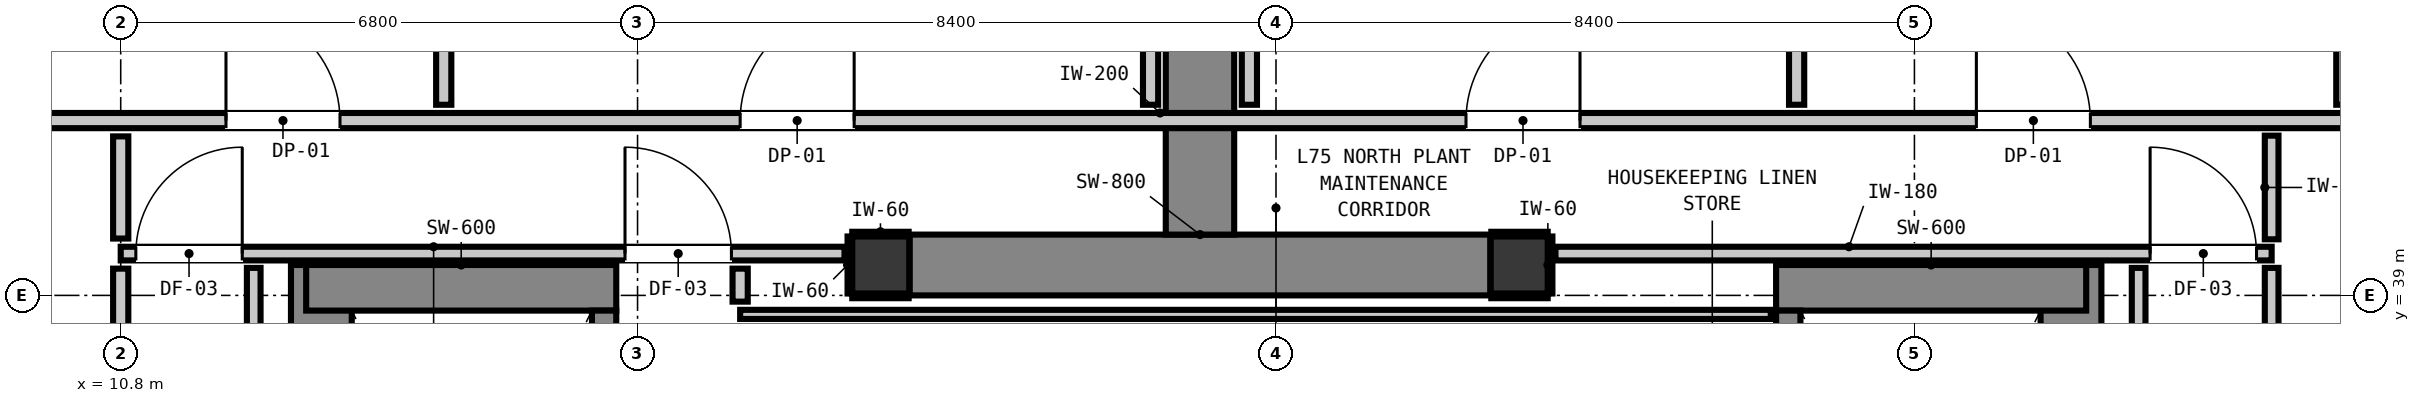
"""IFC4 building model, lengths in metres.
Left out: names, types, materials, properties, quantities, classifications, styles, units other than length and angle.
Written with IfcOpenShell. Run it as: python <this file> out.ifc"""

import sys

from ifc_helpers import new_model, si_unit, direction, frame, frame_2d, origin, origin_2d, place, context, subcontext, project, spatial, rectangle, extrude, element, fill, save


model = new_model("IFC4")
c1 = context("Model", 3, precision=1e-05, world=origin(), true_north=direction((0.0, 1.0)))
c2 = subcontext(c1, "Body", "Model", "MODEL_VIEW")
j1 = project(units=[si_unit("LENGTHUNIT", "METRE"), si_unit("PLANEANGLEUNIT", "RADIAN")], contexts=[c1])
p1 = place(None, origin())
s1 = spatial("IfcSite", under=j1, at=p1, CompositionType="ELEMENT")
p2 = place(p1, origin())
s2 = spatial("IfcBuilding", under=s1, at=p2, CompositionType="ELEMENT")
p3 = place(p2, frame((0.0, 0.0, 257.84)))
s3 = spatial("IfcBuildingStorey", under=s2, at=p3, CompositionType="ELEMENT", Elevation=257.84)
for number, where, z_axis, x_axis in (
    (1, (20.8, 39.4, 0.0), (0.0, 0.0, 1.0), (1.0, 0.0, 0.0)),
    (2, (29.2, 39.4, 0.0), (0.0, 0.0, 1.0), (1.0, 0.0, 0.0)),
):
    element("IfcColumn", number, at=place(p3, frame(where, z_axis=z_axis, x_axis=x_axis)), inside=s3, PredefinedType="COLUMN", context=c2, shape_type="SweptSolid", body=[
        extrude(rectangle(XDim=0.75, YDim=0.75, at=origin_2d()), origin(), (0.0, 0.0, 1.0), 4.4),
    ])
p4 = place(p3, frame((13.44, 31.08, 0.0), z_axis=(0.0, 0.0, 1.0), x_axis=(0.0, 1.0, 0.0)))
e3 = element("IfcWall", 3, at=p4, inside=s3, PredefinedType="SHEAR", context=c2, shape_type="SweptSolid", body=[
    extrude(rectangle(XDim=8.32, YDim=0.8, at=frame_2d((4.16, 0.0))), origin(), (0.0, 0.0, 1.0), 4.4),
])
p5 = place(p3, frame((13.24, 39.1, 0.0), z_axis=(0.0, 0.0, 1.0), x_axis=(1.0, 0.0, 0.0)))
e4 = element("IfcWall", 4, at=p5, inside=s3, PredefinedType="SHEAR", context=c2, shape_type="SweptSolid", body=[
    extrude(rectangle(XDim=4.08, YDim=0.6, at=frame_2d((2.04, 0.0))), origin(), (0.0, 0.0, 1.0), 4.4),
])
p6 = place(p3, frame((36.46, 31.08, 0.0), z_axis=(0.0, 0.0, 1.0), x_axis=(0.0, 1.0, 0.0)))
e5 = element("IfcWall", 5, at=p6, inside=s3, PredefinedType="SHEAR", context=c2, shape_type="SweptSolid", body=[
    extrude(rectangle(XDim=8.32, YDim=0.8, at=frame_2d((4.16, 0.0))), origin(), (0.0, 0.0, 1.0), 4.4),
])
p7 = place(p3, frame((32.58, 39.1, 0.0), z_axis=(0.0, 0.0, 1.0), x_axis=(1.0, 0.0, 0.0)))
e6 = element("IfcWall", 6, at=p7, inside=s3, PredefinedType="SHEAR", context=c2, shape_type="SweptSolid", body=[
    extrude(rectangle(XDim=4.08, YDim=0.6, at=frame_2d((2.04, 0.0))), origin(), (0.0, 0.0, 1.0), 4.4),
])
p8 = place(p3, frame((21.18, 39.4, 0.0), z_axis=(0.0, 0.0, 1.0), x_axis=(1.0, 0.0, 0.0)))
e7 = element("IfcWall", 7, at=p8, inside=s3, PredefinedType="SHEAR", context=c2, shape_type="SweptSolid", body=[
    extrude(rectangle(XDim=7.64, YDim=0.8, at=frame_2d((3.82, 0.0))), origin(), (0.0, 0.0, 1.0), 4.4),
])
p9 = place(p3, frame((17.16, 31.0, 0.0), z_axis=(0.0, 0.0, 1.0), x_axis=(0.0, 1.0, 0.0)))
e8 = element("IfcWall", 8, at=p9, inside=s3, PredefinedType="SHEAR", context=c2, shape_type="SweptSolid", body=[
    extrude(rectangle(XDim=7.8, YDim=0.32, at=frame_2d((3.9, 0.0))), origin(), (0.0, 0.0, 1.0), 4.4),
])
p10 = place(p9, frame((0.19, 0.0, 0.0)))
e9 = element("IfcOpeningElement", 9, at=p10, cuts=e8, PredefinedType="OPENING", context=c2, shape_type="SweptSolid", body=[
    extrude(rectangle(XDim=1.1, YDim=2.15, at=frame_2d((0.55, 1.075))), frame((0.0, 0.17, 0.0), z_axis=(0.0, -1.0, 0.0), x_axis=(1.0, 0.0, 0.0)), (0.0, 0.0, 1.0), 0.34),
])
p11 = place(p3, frame((32.74, 31.0, 0.0), z_axis=(0.0, 0.0, 1.0), x_axis=(0.0, 1.0, 0.0)))
e10 = element("IfcWall", 10, at=p11, inside=s3, PredefinedType="SHEAR", context=c2, shape_type="SweptSolid", body=[
    extrude(rectangle(XDim=7.8, YDim=0.32, at=frame_2d((3.9, 0.0))), origin(), (0.0, 0.0, 1.0), 4.4),
])
p12 = place(p11, frame((0.19, 0.0, 0.0)))
e11 = element("IfcOpeningElement", 11, at=p12, cuts=e10, PredefinedType="OPENING", context=c2, shape_type="SweptSolid", body=[
    extrude(rectangle(XDim=1.1, YDim=2.15, at=frame_2d((0.55, 1.075))), frame((0.0, 0.17, 0.0), z_axis=(0.0, -1.0, 0.0), x_axis=(1.0, 0.0, 0.0)), (0.0, 0.0, 1.0), 0.34),
])
p13 = place(p3, frame((25.0, 39.8, 0.0), z_axis=(0.0, 0.0, 1.0), x_axis=(0.0, 1.0, 0.0)))
e12 = element("IfcWall", 12, at=p13, inside=s3, PredefinedType="SHEAR", context=c2, shape_type="SweptSolid", body=[
    extrude(rectangle(XDim=10.125, YDim=0.9, at=frame_2d((5.062, 0.0))), origin(), (0.0, 0.0, 1.0), 4.18),
])
p14 = place(p3, frame((5.75, 41.3, 0.0), z_axis=(0.0, 0.0, 1.0), x_axis=(1.0, 0.0, 0.0)))
e13 = element("IfcWall", 13, at=p14, inside=s3, PredefinedType="PARTITIONING", context=c2, shape_type="SweptSolid", body=[
    extrude(rectangle(XDim=34.3, YDim=0.2, at=frame_2d((17.15, 0.0))), origin(), (0.0, 0.0, 1.0), 4.18),
])
p15 = place(p14, frame((22.75, 0.0, 0.0)))
e14 = element("IfcOpeningElement", 14, at=p15, cuts=e13, PredefinedType="OPENING", context=c2, shape_type="SweptSolid", body=[
    extrude(rectangle(XDim=1.5, YDim=2.15, at=frame_2d((0.75, 1.075))), frame((0.0, 0.11, 0.0), z_axis=(0.0, -1.0, 0.0), x_axis=(1.0, 0.0, 0.0)), (0.0, 0.0, 1.0), 0.22),
])
p16 = place(p14, frame((29.465, 0.0, 0.0)))
e15 = element("IfcOpeningElement", 15, at=p16, cuts=e13, PredefinedType="OPENING", context=c2, shape_type="SweptSolid", body=[
    extrude(rectangle(XDim=1.5, YDim=2.15, at=frame_2d((0.75, 1.075))), frame((0.0, 0.11, 0.0), z_axis=(0.0, -1.0, 0.0), x_axis=(1.0, 0.0, 0.0)), (0.0, 0.0, 1.0), 0.22),
])
p17 = place(p14, frame((6.435, 0.0, 0.0)))
e16 = element("IfcOpeningElement", 16, at=p17, cuts=e13, PredefinedType="OPENING", context=c2, shape_type="SweptSolid", body=[
    extrude(rectangle(XDim=1.5, YDim=2.15, at=frame_2d((0.75, 1.075))), frame((0.0, 0.11, 0.0), z_axis=(0.0, -1.0, 0.0), x_axis=(1.0, 0.0, 0.0)), (0.0, 0.0, 1.0), 0.22),
])
p18 = place(p14, frame((13.2, 0.0, 0.0)))
e17 = element("IfcOpeningElement", 17, at=p18, cuts=e13, PredefinedType="OPENING", context=c2, shape_type="SweptSolid", body=[
    extrude(rectangle(XDim=1.5, YDim=2.15, at=frame_2d((0.75, 1.075))), frame((0.0, 0.11, 0.0), z_axis=(0.0, -1.0, 0.0), x_axis=(1.0, 0.0, 0.0)), (0.0, 0.0, 1.0), 0.22),
])
p19 = place(p3, frame((10.8, 39.55, 0.0), z_axis=(0.0, 0.0, 1.0), x_axis=(1.0, 0.0, 0.0)))
e18 = element("IfcWall", 18, at=p19, inside=s3, PredefinedType="PARTITIONING", context=c2, shape_type="SweptSolid", body=[
    extrude(rectangle(XDim=9.523, YDim=0.18, at=frame_2d((4.761, 0.0))), origin(), (0.0, 0.0, 1.0), 3.807),
])
p20 = place(p19, frame((6.635, 0.0, 0.0)))
e19 = element("IfcOpeningElement", 19, at=p20, cuts=e18, PredefinedType="OPENING", context=c2, shape_type="SweptSolid", body=[
    extrude(rectangle(XDim=1.4, YDim=2.15, at=frame_2d((0.7, 1.075))), frame((0.0, 0.1, 0.0), z_axis=(0.0, -1.0, 0.0), x_axis=(1.0, 0.0, 0.0)), (0.0, 0.0, 1.0), 0.2),
])
p21 = place(p19, frame((0.199, 0.0, 0.0)))
e20 = element("IfcOpeningElement", 20, at=p21, cuts=e18, PredefinedType="OPENING", context=c2, shape_type="SweptSolid", body=[
    extrude(rectangle(XDim=1.4, YDim=2.15, at=frame_2d((0.7, 1.075))), frame((0.0, 0.1, 0.0), z_axis=(0.0, -1.0, 0.0), x_axis=(1.0, 0.0, 0.0)), (0.0, 0.0, 1.0), 0.2),
])
p22 = place(p3, frame((29.677, 39.55, 0.0), z_axis=(0.0, 0.0, 1.0), x_axis=(1.0, 0.0, 0.0)))
e21 = element("IfcWall", 21, at=p22, inside=s3, PredefinedType="PARTITIONING", context=c2, shape_type="SweptSolid", body=[
    extrude(rectangle(XDim=9.423, YDim=0.18, at=frame_2d((4.711, 0.0))), origin(), (0.0, 0.0, 1.0), 3.807),
])
p23 = place(p22, frame((7.824, 0.0, 0.0)))
e22 = element("IfcOpeningElement", 22, at=p23, cuts=e21, PredefinedType="OPENING", context=c2, shape_type="SweptSolid", body=[
    extrude(rectangle(XDim=1.4, YDim=2.15, at=frame_2d((0.7, 1.075))), frame((0.0, 0.1, 0.0), z_axis=(0.0, -1.0, 0.0), x_axis=(1.0, 0.0, 0.0)), (0.0, 0.0, 1.0), 0.2),
])
p24 = place(p3, frame((18.95, 38.75, 0.0), z_axis=(0.0, 0.0, 1.0), x_axis=(1.0, 0.0, 0.0)))
e23 = element("IfcWall", 23, at=p24, inside=s3, PredefinedType="PARTITIONING", context=c2, shape_type="SweptSolid", body=[
    extrude(rectangle(XDim=13.56, YDim=0.12, at=frame_2d((6.78, 0.0))), origin(), (0.0, 0.0, 1.0), 4.18),
])
p25 = place(p3, frame((10.8, 30.008, 0.0), z_axis=(0.0, 0.0, 1.0), x_axis=(0.0, 1.0, 0.0)))
e24 = element("IfcWall", 24, at=p25, inside=s3, PredefinedType="PARTITIONING", context=c2, shape_type="SweptSolid", body=[
    extrude(rectangle(XDim=9.344, YDim=0.2, at=frame_2d((4.672, 0.0))), origin(), (0.0, 0.0, 1.0), 4.18),
])
p26 = place(p3, frame((10.8, 39.748, 0.0), z_axis=(0.0, 0.0, 1.0), x_axis=(0.0, 1.0, 0.0)))
e25 = element("IfcWall", 25, at=p26, inside=s3, PredefinedType="PARTITIONING", context=c2, shape_type="SweptSolid", body=[
    extrude(rectangle(XDim=1.344, YDim=0.2, at=frame_2d((0.672, 0.0))), origin(), (0.0, 0.0, 1.0), 4.18),
])
p27 = place(p3, frame((15.05, 41.508, 0.0), z_axis=(0.0, 0.0, 1.0), x_axis=(0.0, 1.0, 0.0)))
e26 = element("IfcWall", 26, at=p27, inside=s3, PredefinedType="PARTITIONING", context=c2, shape_type="SweptSolid", body=[
    extrude(rectangle(XDim=7.934, YDim=0.2, at=frame_2d((3.967, 0.0))), origin(), (0.0, 0.0, 1.0), 4.18),
])
p28 = place(p3, frame((18.95, 38.918, 0.0), z_axis=(0.0, 0.0, 1.0), x_axis=(0.0, 1.0, 0.0)))
e27 = element("IfcWall", 27, at=p28, inside=s3, PredefinedType="PARTITIONING", context=c2, shape_type="SweptSolid", body=[
    extrude(rectangle(XDim=0.434, YDim=0.2, at=frame_2d((0.217, 0.0))), origin(), (0.0, 0.0, 1.0), 4.18),
])
for number, where, z_axis, x_axis in (
    (28, (24.35, 41.508, 0.0), (0.0, 0.0, 1.0), (0.0, 1.0, 0.0)),
    (29, (25.65, 41.508, 0.0), (0.0, 0.0, 1.0), (0.0, 1.0, 0.0)),
    (30, (32.85, 41.508, 0.0), (0.0, 0.0, 1.0), (0.0, 1.0, 0.0)),
):
    element("IfcWall", number, at=place(p3, frame(where, z_axis=z_axis, x_axis=x_axis)), inside=s3, PredefinedType="PARTITIONING", context=c2, shape_type="SweptSolid", body=[
        extrude(rectangle(XDim=7.934, YDim=0.2, at=frame_2d((3.967, 0.0))), origin(), (0.0, 0.0, 1.0), 4.18),
    ])
p29 = place(p3, frame((40.05, 41.508, 0.0), z_axis=(0.0, 0.0, 1.0), x_axis=(0.0, 1.0, 0.0)))
e31 = element("IfcWall", 31, at=p29, inside=s3, PredefinedType="PARTITIONING", context=c2, shape_type="SweptSolid", body=[
    extrude(rectangle(XDim=7.934, YDim=0.2, at=frame_2d((3.967, 0.0))), origin(), (0.0, 0.0, 1.0), 3.557),
])
for number, where, z_axis, x_axis in (
    (32, (12.55, 22.068, 0.0), (0.0, 0.0, 1.0), (0.0, 1.0, 0.0)),
    (33, (37.35, 22.068, 0.0), (0.0, 0.0, 1.0), (0.0, 1.0, 0.0)),
    (34, (39.1, 22.068, 0.0), (0.0, 0.0, 1.0), (0.0, 1.0, 0.0)),
):
    element("IfcWall", number, at=place(p3, frame(where, z_axis=z_axis, x_axis=x_axis)), inside=s3, PredefinedType="PARTITIONING", context=c2, shape_type="SweptSolid", body=[
        extrude(rectangle(XDim=17.294, YDim=0.18, at=frame_2d((8.647, 0.0))), origin(), (0.0, 0.0, 1.0), 4.18),
    ])
p30 = place(p3, frame((39.1, 39.738, 0.0), z_axis=(0.0, 0.0, 1.0), x_axis=(0.0, 1.0, 0.0)))
e35 = element("IfcWall", 35, at=p30, inside=s3, PredefinedType="PARTITIONING", context=c2, shape_type="SweptSolid", body=[
    extrude(rectangle(XDim=1.364, YDim=0.18, at=frame_2d((0.682, 0.0))), origin(), (0.0, 0.0, 1.0), 4.18),
])
for number, where, z_axis, x_axis in (
    (36, (20.425, 38.993, 0.0), (0.0, 0.0, 1.0), (1.0, 0.0, 0.0)),
    (37, (20.425, 39.807, 0.0), (0.0, 0.0, 1.0), (1.0, 0.0, 0.0)),
):
    element("IfcWall", number, at=place(p3, frame(where, z_axis=z_axis, x_axis=x_axis)), inside=s3, PredefinedType="PARTITIONING", context=c2, shape_type="SweptSolid", body=[
        extrude(rectangle(XDim=0.742, YDim=0.06, at=frame_2d((0.371, 0.0))), origin(), (0.0, 0.0, 1.0), 1.45),
    ])
p31 = place(p3, frame((20.393, 39.025, 0.0), z_axis=(0.0, 0.0, 1.0), x_axis=(0.0, 1.0, 0.0)))
e38 = element("IfcWall", 38, at=p31, inside=s3, PredefinedType="PARTITIONING", context=c2, shape_type="SweptSolid", body=[
    extrude(rectangle(XDim=0.75, YDim=0.06, at=frame_2d((0.375, 0.0))), origin(), (0.0, 0.0, 1.0), 1.45),
])
for number, where, z_axis, x_axis in (
    (39, (28.833, 38.993, 0.0), (0.0, 0.0, 1.0), (1.0, 0.0, 0.0)),
    (40, (28.833, 39.807, 0.0), (0.0, 0.0, 1.0), (1.0, 0.0, 0.0)),
):
    element("IfcWall", number, at=place(p3, frame(where, z_axis=z_axis, x_axis=x_axis)), inside=s3, PredefinedType="PARTITIONING", context=c2, shape_type="SweptSolid", body=[
        extrude(rectangle(XDim=0.742, YDim=0.06, at=frame_2d((0.371, 0.0))), origin(), (0.0, 0.0, 1.0), 1.45),
    ])
p32 = place(p3, frame((29.607, 39.025, 0.0), z_axis=(0.0, 0.0, 1.0), x_axis=(0.0, 1.0, 0.0)))
e41 = element("IfcWall", 41, at=p32, inside=s3, PredefinedType="PARTITIONING", context=c2, shape_type="SweptSolid", body=[
    extrude(rectangle(XDim=0.75, YDim=0.06, at=frame_2d((0.375, 0.0))), origin(), (0.0, 0.0, 1.0), 1.45),
])
p33 = place(p20, origin())
e42 = element("IfcDoor", 42, at=p33, inside=s3, OperationType="SINGLE_SWING_LEFT", PredefinedType="DOOR", context=c2, shape_type="SweptSolid", body=[
    extrude(rectangle(XDim=1.4, YDim=2.15, at=frame_2d((0.7, 1.075))), frame((0.0, 0.025, 0.0), z_axis=(0.0, -1.0, 0.0), x_axis=(1.0, 0.0, 0.0)), (0.0, 0.0, 1.0), 0.05),
])
fill(e19, e42)
p34 = place(p21, origin())
e43 = element("IfcDoor", 43, at=p34, inside=s3, OperationType="SINGLE_SWING_RIGHT", PredefinedType="DOOR", context=c2, shape_type="SweptSolid", body=[
    extrude(rectangle(XDim=1.4, YDim=2.15, at=frame_2d((0.7, 1.075))), frame((0.0, 0.025, 0.0), z_axis=(0.0, -1.0, 0.0), x_axis=(1.0, 0.0, 0.0)), (0.0, 0.0, 1.0), 0.05),
])
fill(e20, e43)
p35 = place(p23, origin())
e44 = element("IfcDoor", 44, at=p35, inside=s3, OperationType="SINGLE_SWING_LEFT", PredefinedType="DOOR", context=c2, shape_type="SweptSolid", body=[
    extrude(rectangle(XDim=1.4, YDim=2.15, at=frame_2d((0.7, 1.075))), frame((0.0, 0.025, 0.0), z_axis=(0.0, -1.0, 0.0), x_axis=(1.0, 0.0, 0.0)), (0.0, 0.0, 1.0), 0.05),
])
fill(e22, e44)
p36 = place(p15, origin())
e45 = element("IfcDoor", 45, at=p36, inside=s3, OperationType="SINGLE_SWING_RIGHT", PredefinedType="DOOR", context=c2, shape_type="SweptSolid", body=[
    extrude(rectangle(XDim=1.5, YDim=2.15, at=frame_2d((0.75, 1.075))), frame((0.0, 0.025, 0.0), z_axis=(0.0, -1.0, 0.0), x_axis=(1.0, 0.0, 0.0)), (0.0, 0.0, 1.0), 0.05),
])
fill(e14, e45)
p37 = place(p16, origin())
e46 = element("IfcDoor", 46, at=p37, inside=s3, OperationType="SINGLE_SWING_LEFT", PredefinedType="DOOR", context=c2, shape_type="SweptSolid", body=[
    extrude(rectangle(XDim=1.5, YDim=2.15, at=frame_2d((0.75, 1.075))), frame((0.0, 0.025, 0.0), z_axis=(0.0, -1.0, 0.0), x_axis=(1.0, 0.0, 0.0)), (0.0, 0.0, 1.0), 0.05),
])
fill(e15, e46)
p38 = place(p17, origin())
e47 = element("IfcDoor", 47, at=p38, inside=s3, OperationType="SINGLE_SWING_LEFT", PredefinedType="DOOR", context=c2, shape_type="SweptSolid", body=[
    extrude(rectangle(XDim=1.5, YDim=2.15, at=frame_2d((0.75, 1.075))), frame((0.0, 0.025, 0.0), z_axis=(0.0, -1.0, 0.0), x_axis=(1.0, 0.0, 0.0)), (0.0, 0.0, 1.0), 0.05),
])
fill(e16, e47)
p39 = place(p18, origin())
e48 = element("IfcDoor", 48, at=p39, inside=s3, OperationType="SINGLE_SWING_RIGHT", PredefinedType="DOOR", context=c2, shape_type="SweptSolid", body=[
    extrude(rectangle(XDim=1.5, YDim=2.15, at=frame_2d((0.75, 1.075))), frame((0.0, 0.025, 0.0), z_axis=(0.0, -1.0, 0.0), x_axis=(1.0, 0.0, 0.0)), (0.0, 0.0, 1.0), 0.05),
])
fill(e17, e48)
save(model, sys.argv[1])
